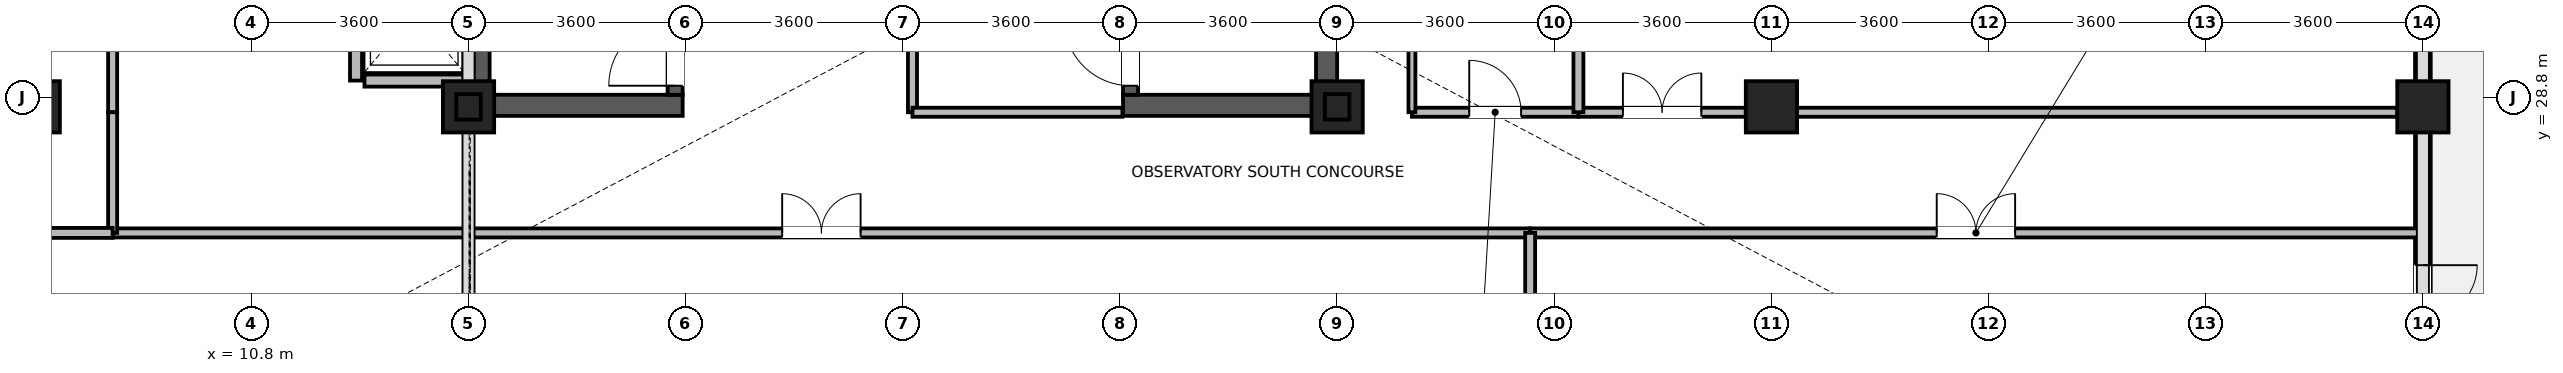
"""IFC4 building model, lengths in metres.
Left out: names, types, materials, properties, quantities, classifications, styles, units other than length and angle.
Written with IfcOpenShell. Run it as: python <this file> out.ifc"""

import sys

from ifc_helpers import new_model, si_unit, direction, frame, frame_2d, origin, origin_2d, place, context, subcontext, project, spatial, rectangle, i_section, extrude, source, transform, mapped, element, fill, save


model = new_model("IFC4")
c1 = context("Model", 3, precision=1e-05, world=origin(), true_north=direction((0.0, 1.0)))
c2 = subcontext(c1, "Body", "Model", "MODEL_VIEW")
j1 = project(units=[si_unit("LENGTHUNIT", "METRE"), si_unit("PLANEANGLEUNIT", "RADIAN")], contexts=[c1])
p1 = place(None, origin())
s1 = spatial("IfcSite", under=j1, at=p1, CompositionType="ELEMENT")
p2 = place(p1, origin())
s2 = spatial("IfcBuilding", under=s1, at=p2, CompositionType="ELEMENT")
p3 = place(p2, frame((0.0, 0.0, 298.0)))
s3 = spatial("IfcBuildingStorey", under=s2, at=p3, CompositionType="ELEMENT", Elevation=298.0)
for number, where, z_axis, x_axis in (
    (1, (14.575, 28.5, 0.0), (0.0, 0.0, 1.0), (0.0, 1.0, 0.0)),
    (2, (28.625, 28.5, 0.0), (0.0, 0.0, 1.0), (0.0, 1.0, 0.0)),
):
    element("IfcWall", number, at=place(p3, frame(where, z_axis=z_axis, x_axis=x_axis)), inside=s3, PredefinedType="SHEAR", context=c2, shape_type="SweptSolid", body=[
        extrude(rectangle(XDim=7.7, YDim=0.35, at=frame_2d((3.85, 0.0))), origin(), (0.0, 0.0, 1.0), 6.0),
    ])
for number, where, z_axis, x_axis in (
    (3, (14.75, 28.675, 0.0), (0.0, 0.0, 1.0), (1.0, 0.0, 0.0)),
    (4, (25.25, 28.675, 0.0), (0.0, 0.0, 1.0), (1.0, 0.0, 0.0)),
):
    element("IfcWall", number, at=place(p3, frame(where, z_axis=z_axis, x_axis=x_axis)), inside=s3, PredefinedType="SHEAR", context=c2, shape_type="SweptSolid", body=[
        extrude(rectangle(XDim=3.2, YDim=0.35, at=frame_2d((1.6, 0.0))), origin(), (0.0, 0.0, 1.0), 6.0),
    ])
p4 = place(p3, frame((17.825, 28.85, 0.0), z_axis=(0.0, 0.0, 1.0), x_axis=(0.0, 1.0, 0.0)))
e5 = element("IfcWall", 5, at=p4, inside=s3, PredefinedType="SHEAR", context=c2, shape_type="SweptSolid", body=[
    extrude(rectangle(XDim=7.0, YDim=0.25, at=frame_2d((3.5, 0.0))), origin(), (0.0, 0.0, 1.0), 6.0),
])
p5 = place(p4, frame((0.15, 0.0, 0.0)))
e6 = element("IfcOpeningElement", 6, at=p5, cuts=e5, PredefinedType="OPENING", context=c2, shape_type="SweptSolid", body=[
    extrude(rectangle(XDim=1.1, YDim=2.08, at=frame_2d((0.55, 1.04))), frame((0.0, 0.135, 0.0), z_axis=(0.0, -1.0, 0.0), x_axis=(1.0, 0.0, 0.0)), (0.0, 0.0, 1.0), 0.27),
])
p6 = place(p3, frame((25.375, 28.85, 0.0), z_axis=(0.0, 0.0, 1.0), x_axis=(0.0, 1.0, 0.0)))
e7 = element("IfcWall", 7, at=p6, inside=s3, PredefinedType="SHEAR", context=c2, shape_type="SweptSolid", body=[
    extrude(rectangle(XDim=7.0, YDim=0.25, at=frame_2d((3.5, 0.0))), origin(), (0.0, 0.0, 1.0), 6.0),
])
p7 = place(p6, frame((0.15, 0.0, 0.0)))
e8 = element("IfcOpeningElement", 8, at=p7, cuts=e7, PredefinedType="OPENING", context=c2, shape_type="SweptSolid", body=[
    extrude(rectangle(XDim=1.1, YDim=2.08, at=frame_2d((0.55, 1.04))), frame((0.0, 0.135, 0.0), z_axis=(0.0, -1.0, 0.0), x_axis=(1.0, 0.0, 0.0)), (0.0, 0.0, 1.0), 0.27),
])
m1 = source(origin(), c2, "Body", "SweptSolid", [
    extrude(rectangle(XDim=0.85, YDim=0.85, at=origin_2d()), origin(), (0.0, 0.0, 1.0), 6.0),
])
for number, where, z_axis, x_axis in (
    (9, (7.2, 28.65, 0.0), (0.0, 0.0, 1.0), (1.0, 0.0, 0.0)),
    (10, (14.4, 28.65, 0.0), (0.0, 0.0, 1.0), (1.0, 0.0, 0.0)),
    (11, (28.8, 28.65, 0.0), (0.0, 0.0, 1.0), (1.0, 0.0, 0.0)),
    (12, (36.0, 28.65, 0.0), (0.0, 0.0, 1.0), (1.0, 0.0, 0.0)),
    (13, (46.8, 28.65, 0.0), (0.0, 0.0, 1.0), (1.0, 0.0, 0.0)),
):
    element("IfcColumn", number, at=place(p3, frame(where, z_axis=z_axis, x_axis=x_axis)), inside=s3, PredefinedType="COLUMN", context=c2, shape_type="MappedRepresentation", body=[
        mapped(m1, transform((0.0, 0.0, 0.0), x_axis=(1.0, 0.0, 0.0), y_axis=(0.0, 1.0, 0.0), z_axis=(0.0, 0.0, 1.0), scale=1.0)),
    ])
m2 = source(origin(), c2, "Body", "SweptSolid", [
    extrude(i_section(OverallWidth=0.406, OverallDepth=0.422, WebThickness=0.023, FlangeThickness=0.031, FilletRadius=0.015, at=origin_2d()), origin(), (0.0, 0.0, 1.0), 28.41),
])
p8 = place(p3, frame((14.4, 28.65, 6.0), z_axis=(0.0, 0.0, 1.0), x_axis=(1.0, 0.0, 0.0)))
e14 = element("IfcColumn", 14, at=p8, inside=s3, PredefinedType="COLUMN", context=c2, shape_type="MappedRepresentation", body=[
    mapped(m2, transform((0.0, 0.0, 0.0), x_axis=(1.0, 0.0, 0.0), y_axis=(0.0, 1.0, 0.0), z_axis=(0.0, 0.0, 1.0), scale=1.0)),
])
m3 = source(origin(), c2, "Body", "SweptSolid", [
    extrude(i_section(OverallWidth=0.406, OverallDepth=0.422, WebThickness=0.023, FlangeThickness=0.031, FilletRadius=0.015, at=origin_2d()), origin(), (0.0, 0.0, 1.0), 29.81),
])
p9 = place(p3, frame((28.8, 28.65, 6.0), z_axis=(0.0, 0.0, 1.0), x_axis=(1.0, 0.0, 0.0)))
e15 = element("IfcColumn", 15, at=p9, inside=s3, PredefinedType="COLUMN", context=c2, shape_type="MappedRepresentation", body=[
    mapped(m3, transform((0.0, 0.0, 0.0), x_axis=(1.0, 0.0, 0.0), y_axis=(0.0, 1.0, 0.0), z_axis=(0.0, 0.0, 1.0), scale=1.0)),
])
p10 = place(p3, frame((46.8, 28.224, 0.0), z_axis=(0.0, 0.0, 1.0), x_axis=(0.0, -1.0, 0.0)))
e16 = element("IfcWall", 16, at=p10, inside=s3, PredefinedType="STANDARD", context=c2, shape_type="SweptSolid", body=[
    extrude(rectangle(XDim=6.198, YDim=0.26, at=frame_2d((3.099, 0.0))), origin(), (0.0, 0.0, 1.0), 5.58),
])
p11 = place(p10, frame((2.199, 0.0, 0.0)))
e17 = element("IfcOpeningElement", 17, at=p11, cuts=e16, PredefinedType="OPENING", context=c2, shape_type="SweptSolid", body=[
    extrude(rectangle(XDim=1.8, YDim=2.2, at=frame_2d((0.9, 1.1))), frame((0.0, 0.14, 0.0), z_axis=(0.0, -1.0, 0.0), x_axis=(1.0, 0.0, 0.0)), (0.0, 0.0, 1.0), 0.28),
])
p12 = place(p3, frame((46.8, 35.724, 0.0), z_axis=(0.0, 0.0, 1.0), x_axis=(0.0, -1.0, 0.0)))
e18 = element("IfcWall", 18, at=p12, inside=s3, PredefinedType="STANDARD", context=c2, shape_type="SweptSolid", body=[
    extrude(rectangle(XDim=6.648, YDim=0.26, at=frame_2d((3.324, 0.0))), origin(), (0.0, 0.0, 1.0), 5.58),
])
p13 = place(p12, frame((0.762, 0.0, 0.85)))
e19 = element("IfcOpeningElement", 19, at=p13, cuts=e18, PredefinedType="OPENING", context=c2, shape_type="SweptSolid", body=[
    extrude(rectangle(XDim=1.8, YDim=1.85, at=frame_2d((0.9, 0.925))), frame((0.0, 0.14, 0.0), z_axis=(0.0, -1.0, 0.0), x_axis=(1.0, 0.0, 0.0)), (0.0, 0.0, 1.0), 0.28),
])
p14 = place(p12, frame((4.086, 0.0, 0.85)))
e20 = element("IfcOpeningElement", 20, at=p14, cuts=e18, PredefinedType="OPENING", context=c2, shape_type="SweptSolid", body=[
    extrude(rectangle(XDim=1.8, YDim=1.85, at=frame_2d((0.9, 0.925))), frame((0.0, 0.14, 0.0), z_axis=(0.0, -1.0, 0.0), x_axis=(1.0, 0.0, 0.0)), (0.0, 0.0, 1.0), 0.28),
])
p15 = place(p3, frame((12.675, 29.085, 0.0), z_axis=(0.0, 0.0, 1.0), x_axis=(1.0, 0.0, 0.0)))
e21 = element("IfcWall", 21, at=p15, inside=s3, PredefinedType="PARTITIONING", context=c2, shape_type="SweptSolid", body=[
    extrude(rectangle(XDim=1.65, YDim=0.2, at=frame_2d((0.825, 0.0))), origin(), (0.0, 0.0, 1.0), 5.9),
])
p16 = place(p3, frame((12.535, 29.085, 0.0), z_axis=(0.0, 0.0, 1.0), x_axis=(0.0, 1.0, 0.0)))
e22 = element("IfcWall", 22, at=p16, inside=s3, PredefinedType="PARTITIONING", context=c2, shape_type="SweptSolid", body=[
    extrude(rectangle(XDim=2.23, YDim=0.2, at=frame_2d((1.115, 0.0))), origin(), (0.0, 0.0, 1.0), 5.9),
])
p17 = place(p3, frame((8.5, 26.56, 0.0), z_axis=(0.0, 0.0, 1.0), x_axis=(1.0, 0.0, 0.0)))
e23 = element("IfcWall", 23, at=p17, inside=s3, PredefinedType="PARTITIONING", context=c2, shape_type="SweptSolid", body=[
    extrude(rectangle(XDim=23.5, YDim=0.15, at=frame_2d((11.75, 0.0))), origin(), (0.0, 0.0, 1.0), 5.9),
])
p18 = place(p17, frame((11.1, 0.0, 0.0)))
e24 = element("IfcOpeningElement", 24, at=p18, cuts=e23, PredefinedType="OPENING", context=c2, shape_type="SweptSolid", body=[
    extrude(rectangle(XDim=1.3, YDim=2.12, at=frame_2d((0.65, 1.06))), frame((0.0, 0.085, 0.0), z_axis=(0.0, -1.0, 0.0), x_axis=(1.0, 0.0, 0.0)), (0.0, 0.0, 1.0), 0.17),
])
p19 = place(p3, frame((32.0, 26.56, 0.0), z_axis=(0.0, 0.0, 1.0), x_axis=(1.0, 0.0, 0.0)))
e25 = element("IfcWall", 25, at=p19, inside=s3, PredefinedType="PARTITIONING", context=c2, shape_type="SweptSolid", body=[
    extrude(rectangle(XDim=14.78, YDim=0.15, at=frame_2d((7.39, 0.0))), origin(), (0.0, 0.0, 1.0), 5.9),
])
p20 = place(p19, frame((6.74, 0.0, 0.0)))
e26 = element("IfcOpeningElement", 26, at=p20, cuts=e25, PredefinedType="OPENING", context=c2, shape_type="SweptSolid", body=[
    extrude(rectangle(XDim=1.3, YDim=2.12, at=frame_2d((0.65, 1.06))), frame((0.0, 0.085, 0.0), z_axis=(0.0, -1.0, 0.0), x_axis=(1.0, 0.0, 0.0)), (0.0, 0.0, 1.0), 0.17),
])
p21 = place(p3, frame((32.8, 28.56, 0.0), z_axis=(0.0, 0.0, 1.0), x_axis=(1.0, 0.0, 0.0)))
e27 = element("IfcWall", 27, at=p21, inside=s3, PredefinedType="PARTITIONING", context=c2, shape_type="SweptSolid", body=[
    extrude(rectangle(XDim=2.775, YDim=0.15, at=frame_2d((1.387, 0.0))), origin(), (0.0, 0.0, 1.0), 5.43),
])
p22 = place(p21, frame((0.738, 0.0, 0.0)))
e28 = element("IfcOpeningElement", 28, at=p22, cuts=e27, PredefinedType="OPENING", context=c2, shape_type="SweptSolid", body=[
    extrude(rectangle(XDim=1.3, YDim=2.12, at=frame_2d((0.65, 1.06))), frame((0.0, 0.085, 0.0), z_axis=(0.0, -1.0, 0.0), x_axis=(1.0, 0.0, 0.0)), (0.0, 0.0, 1.0), 0.17),
])
p23 = place(p3, frame((36.425, 28.56, 0.0), z_axis=(0.0, 0.0, 1.0), x_axis=(1.0, 0.0, 0.0)))
e29 = element("IfcWall", 29, at=p23, inside=s3, PredefinedType="PARTITIONING", context=c2, shape_type="SweptSolid", body=[
    extrude(rectangle(XDim=9.95, YDim=0.15, at=frame_2d((4.975, 0.0))), origin(), (0.0, 0.0, 1.0), 5.43),
])
p24 = place(p3, frame((8.5, 28.56, 0.0), z_axis=(0.0, 0.0, 1.0), x_axis=(0.0, 1.0, 0.0)))
e30 = element("IfcWall", 30, at=p24, inside=s3, PredefinedType="PARTITIONING", context=c2, shape_type="SweptSolid", body=[
    extrude(rectangle(XDim=7.68, YDim=0.15, at=frame_2d((3.84, 0.0))), origin(), (0.0, 0.0, 1.0), 5.9),
])
p25 = place(p24, frame((3.19, 0.0, 0.0)))
e31 = element("IfcOpeningElement", 31, at=p25, cuts=e30, PredefinedType="OPENING", context=c2, shape_type="SweptSolid", body=[
    extrude(rectangle(XDim=1.3, YDim=2.12, at=frame_2d((0.65, 1.06))), frame((0.0, 0.085, 0.0), z_axis=(0.0, -1.0, 0.0), x_axis=(1.0, 0.0, 0.0)), (0.0, 0.0, 1.0), 0.17),
])
p26 = place(p3, frame((30.04, 28.56, 0.0), z_axis=(0.0, 0.0, 1.0), x_axis=(1.0, 0.0, 0.0)))
e32 = element("IfcWall", 32, at=p26, inside=s3, PredefinedType="PARTITIONING", context=c2, shape_type="SweptSolid", body=[
    extrude(rectangle(XDim=2.76, YDim=0.15, at=frame_2d((1.38, 0.0))), origin(), (0.0, 0.0, 1.0), 5.43),
])
p27 = place(p26, frame((0.95, 0.0, 0.0)))
e33 = element("IfcOpeningElement", 33, at=p27, cuts=e32, PredefinedType="OPENING", context=c2, shape_type="SweptSolid", body=[
    extrude(rectangle(XDim=0.86, YDim=2.02, at=frame_2d((0.43, 1.01))), frame((0.0, 0.085, 0.0), z_axis=(0.0, -1.0, 0.0), x_axis=(1.0, 0.0, 0.0)), (0.0, 0.0, 1.0), 0.17),
])
p28 = place(p3, frame((8.5, 26.56, 0.0), z_axis=(0.0, 0.0, 1.0), x_axis=(0.0, 1.0, 0.0)))
e34 = element("IfcWall", 34, at=p28, inside=s3, PredefinedType="PARTITIONING", context=c2, shape_type="SweptSolid", body=[
    extrude(rectangle(XDim=2.0, YDim=0.15, at=frame_2d((1.0, 0.0))), origin(), (0.0, 0.0, 1.0), 5.9),
])
p29 = place(p3, frame((32.0, 20.532, 0.0), z_axis=(0.0, 0.0, 1.0), x_axis=(0.0, 1.0, 0.0)))
e35 = element("IfcWall", 35, at=p29, inside=s3, PredefinedType="PARTITIONING", context=c2, shape_type="SweptSolid", body=[
    extrude(rectangle(XDim=6.028, YDim=0.165, at=frame_2d((3.014, 0.0))), origin(), (0.0, 0.0, 1.0), 5.9),
])
p30 = place(p3, frame((3.732, 26.56, 0.0), z_axis=(0.0, 0.0, 1.0), x_axis=(1.0, 0.0, 0.0)))
e36 = element("IfcWall", 36, at=p30, inside=s3, PredefinedType="PARTITIONING", context=c2, shape_type="SweptSolid", body=[
    extrude(rectangle(XDim=4.768, YDim=0.165, at=frame_2d((2.384, 0.0))), origin(), (0.0, 0.0, 1.0), 5.9),
])
p31 = place(p3, frame((21.76, 28.56, 0.0), z_axis=(0.0, 0.0, 1.0), x_axis=(0.0, 1.0, 0.0)))
e37 = element("IfcWall", 37, at=p31, inside=s3, PredefinedType="PARTITIONING", context=c2, shape_type="SweptSolid", body=[
    extrude(rectangle(XDim=4.6, YDim=0.15, at=frame_2d((2.3, 0.0))), origin(), (0.0, 0.0, 1.0), 5.9),
])
p32 = place(p31, frame((1.55, 0.0, 0.0)))
e38 = element("IfcOpeningElement", 38, at=p32, cuts=e37, PredefinedType="OPENING", context=c2, shape_type="SweptSolid", body=[
    extrude(rectangle(XDim=1.5, YDim=2.1, at=frame_2d((0.75, 1.05))), frame((0.0, 0.085, 0.0), z_axis=(0.0, -1.0, 0.0), x_axis=(1.0, 0.0, 0.0)), (0.0, 0.0, 1.0), 0.17),
])
p33 = place(p3, frame((21.76, 28.56, 0.0), z_axis=(0.0, 0.0, 1.0), x_axis=(1.0, 0.0, 0.0)))
e39 = element("IfcWall", 39, at=p33, inside=s3, PredefinedType="PARTITIONING", context=c2, shape_type="SweptSolid", body=[
    extrude(rectangle(XDim=3.48, YDim=0.15, at=frame_2d((1.74, 0.0))), origin(), (0.0, 0.0, 1.0), 5.08),
])
p34 = place(p3, frame((30.04, 28.56, 0.0), z_axis=(0.0, 0.0, 1.0), x_axis=(0.0, 1.0, 0.0)))
e40 = element("IfcWall", 40, at=p34, inside=s3, PredefinedType="PARTITIONING", context=c2, shape_type="SweptSolid", body=[
    extrude(rectangle(XDim=3.24, YDim=0.115, at=frame_2d((1.62, 0.0))), origin(), (0.0, 0.0, 1.0), 5.9),
])
p35 = place(p3, frame((32.8, 28.56, 0.0), z_axis=(0.0, 0.0, 1.0), x_axis=(0.0, 1.0, 0.0)))
e41 = element("IfcWall", 41, at=p35, inside=s3, PredefinedType="PARTITIONING", context=c2, shape_type="SweptSolid", body=[
    extrude(rectangle(XDim=3.24, YDim=0.165, at=frame_2d((1.62, 0.0))), origin(), (0.0, 0.0, 1.0), 5.9),
])
p36 = place(p11, origin())
e42 = element("IfcDoor", 42, at=p36, inside=s3, OperationType="DOUBLE_DOOR_SINGLE_SWING", PredefinedType="DOOR", context=c2, shape_type="SweptSolid", body=[
    extrude(rectangle(XDim=1.8, YDim=2.2, at=frame_2d((0.9, 1.1))), frame((0.0, 0.025, 0.0), z_axis=(0.0, -1.0, 0.0), x_axis=(1.0, 0.0, 0.0)), (0.0, 0.0, 1.0), 0.05),
])
fill(e17, e42)
p37 = place(p5, origin())
e43 = element("IfcDoor", 43, at=p37, inside=s3, OperationType="SINGLE_SWING_LEFT", PredefinedType="DOOR", context=c2, shape_type="SweptSolid", body=[
    extrude(rectangle(XDim=1.1, YDim=2.08, at=frame_2d((0.55, 1.04))), frame((0.0, 0.025, 0.0), z_axis=(0.0, -1.0, 0.0), x_axis=(1.0, 0.0, 0.0)), (0.0, 0.0, 1.0), 0.05),
])
fill(e6, e43)
p38 = place(p7, origin())
e44 = element("IfcDoor", 44, at=p38, inside=s3, OperationType="SINGLE_SWING_RIGHT", PredefinedType="DOOR", context=c2, shape_type="SweptSolid", body=[
    extrude(rectangle(XDim=1.1, YDim=2.08, at=frame_2d((0.55, 1.04))), frame((0.0, 0.025, 0.0), z_axis=(0.0, -1.0, 0.0), x_axis=(1.0, 0.0, 0.0)), (0.0, 0.0, 1.0), 0.05),
])
fill(e8, e44)
p39 = place(p18, origin())
e45 = element("IfcDoor", 45, at=p39, inside=s3, OperationType="DOUBLE_DOOR_SINGLE_SWING", PredefinedType="DOOR", context=c2, shape_type="SweptSolid", body=[
    extrude(rectangle(XDim=1.3, YDim=2.12, at=frame_2d((0.65, 1.06))), frame((0.0, 0.025, 0.0), z_axis=(0.0, -1.0, 0.0), x_axis=(1.0, 0.0, 0.0)), (0.0, 0.0, 1.0), 0.05),
])
fill(e24, e45)
p40 = place(p20, origin())
e46 = element("IfcDoor", 46, at=p40, inside=s3, OperationType="DOUBLE_DOOR_SINGLE_SWING", PredefinedType="DOOR", context=c2, shape_type="SweptSolid", body=[
    extrude(rectangle(XDim=1.3, YDim=2.12, at=frame_2d((0.65, 1.06))), frame((0.0, 0.025, 0.0), z_axis=(0.0, -1.0, 0.0), x_axis=(1.0, 0.0, 0.0)), (0.0, 0.0, 1.0), 0.05),
])
fill(e26, e46)
p41 = place(p22, origin())
e47 = element("IfcDoor", 47, at=p41, inside=s3, OperationType="DOUBLE_DOOR_SINGLE_SWING", PredefinedType="DOOR", context=c2, shape_type="SweptSolid", body=[
    extrude(rectangle(XDim=1.3, YDim=2.12, at=frame_2d((0.65, 1.06))), frame((0.0, 0.025, 0.0), z_axis=(0.0, -1.0, 0.0), x_axis=(1.0, 0.0, 0.0)), (0.0, 0.0, 1.0), 0.05),
])
fill(e28, e47)
p42 = place(p27, origin())
e48 = element("IfcDoor", 48, at=p42, inside=s3, OperationType="SINGLE_SWING_LEFT", PredefinedType="DOOR", context=c2, shape_type="SweptSolid", body=[
    extrude(rectangle(XDim=0.86, YDim=2.02, at=frame_2d((0.43, 1.01))), frame((0.0, 0.025, 0.0), z_axis=(0.0, -1.0, 0.0), x_axis=(1.0, 0.0, 0.0)), (0.0, 0.0, 1.0), 0.05),
])
fill(e33, e48)
save(model, sys.argv[1])
